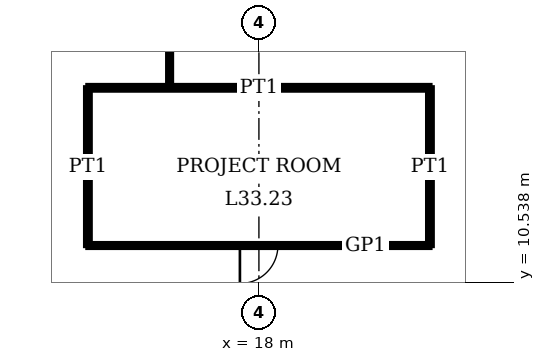
"""IFC4 building model, lengths in metres.
Left out: names, types, materials, properties, quantities, classifications, styles, units other than length and angle.
Written with IfcOpenShell. Run it as: python <this file> out.ifc"""

import sys

from ifc_helpers import new_model, si_unit, direction, frame, frame_2d, origin, place, context, subcontext, project, spatial, rectangle, extrude, element, fill, save


model = new_model("IFC4")
c1 = context("Model", 3, precision=1e-05, world=origin(), true_north=direction((0.0, 1.0)))
c2 = subcontext(c1, "Body", "Model", "MODEL_VIEW")
j1 = project(units=[si_unit("LENGTHUNIT", "METRE"), si_unit("PLANEANGLEUNIT", "RADIAN")], contexts=[c1])
p1 = place(None, origin())
s1 = spatial("IfcSite", under=j1, at=p1, CompositionType="ELEMENT")
p2 = place(p1, origin())
s2 = spatial("IfcBuilding", under=s1, at=p2, CompositionType="ELEMENT")
p3 = place(p2, frame((0.0, 0.0, 137.0)))
s3 = spatial("IfcBuildingStorey", under=s2, at=p3, CompositionType="ELEMENT", Elevation=137.0)
p4 = place(p3, frame((13.5, 11.5, 0.0), z_axis=(0.0, 0.0, 1.0), x_axis=(1.0, 0.0, 0.0)))
e1 = element("IfcWall", 1, at=p4, inside=s3, PredefinedType="PARTITIONING", context=c2, shape_type="SweptSolid", body=[
    extrude(rectangle(XDim=9.0, YDim=0.1, at=frame_2d((4.5, 0.0))), origin(), (0.0, 0.0, 1.0), 3.75),
])
p5 = place(p4, frame((4.0, 0.0, 0.0)))
e2 = element("IfcOpeningElement", 2, at=p5, cuts=e1, PredefinedType="OPENING", context=c2, shape_type="SweptSolid", body=[
    extrude(rectangle(XDim=1.0, YDim=2.4, at=frame_2d((0.5, 1.2))), frame((0.0, 0.06, 0.0), z_axis=(0.0, -1.0, 0.0), x_axis=(1.0, 0.0, 0.0)), (0.0, 0.0, 1.0), 0.12),
])
p6 = place(p3, frame((13.5, 15.65, 0.0), z_axis=(0.0, 0.0, 1.0), x_axis=(1.0, 0.0, 0.0)))
e3 = element("IfcWall", 3, at=p6, inside=s3, PredefinedType="PARTITIONING", context=c2, shape_type="SweptSolid", body=[
    extrude(rectangle(XDim=9.0, YDim=0.12, at=frame_2d((4.5, 0.0))), origin(), (0.0, 0.0, 1.0), 3.75),
])
p7 = place(p3, frame((13.5, 11.5, 0.0), z_axis=(0.0, 0.0, 1.0), x_axis=(0.0, 1.0, 0.0)))
e4 = element("IfcWall", 4, at=p7, inside=s3, PredefinedType="PARTITIONING", context=c2, shape_type="SweptSolid", body=[
    extrude(rectangle(XDim=4.15, YDim=0.12, at=frame_2d((2.075, 0.0))), origin(), (0.0, 0.0, 1.0), 3.75),
])
p8 = place(p3, frame((15.65, 15.65, 0.0), z_axis=(0.0, 0.0, 1.0), x_axis=(0.0, 1.0, 0.0)))
e5 = element("IfcWall", 5, at=p8, inside=s3, PredefinedType="PARTITIONING", context=c2, shape_type="SweptSolid", body=[
    extrude(rectangle(XDim=6.85, YDim=0.1, at=frame_2d((3.425, 0.0))), origin(), (0.0, 0.0, 1.0), 3.75),
])
p9 = place(p8, frame((2.925, 0.0, 0.0)))
e6 = element("IfcOpeningElement", 6, at=p9, cuts=e5, PredefinedType="OPENING", context=c2, shape_type="SweptSolid", body=[
    extrude(rectangle(XDim=1.0, YDim=2.4, at=frame_2d((0.5, 1.2))), frame((0.0, 0.06, 0.0), z_axis=(0.0, -1.0, 0.0), x_axis=(1.0, 0.0, 0.0)), (0.0, 0.0, 1.0), 0.12),
])
p10 = place(p3, frame((22.5, 11.5, 0.0), z_axis=(0.0, 0.0, 1.0), x_axis=(0.0, 1.0, 0.0)))
e7 = element("IfcWall", 7, at=p10, inside=s3, PredefinedType="PARTITIONING", context=c2, shape_type="SweptSolid", body=[
    extrude(rectangle(XDim=4.15, YDim=0.12, at=frame_2d((2.075, 0.0))), origin(), (0.0, 0.0, 1.0), 3.75),
])
p11 = place(p5, origin())
e8 = element("IfcDoor", 8, at=p11, inside=s3, OperationType="SINGLE_SWING_LEFT", PredefinedType="DOOR", context=c2, shape_type="SweptSolid", body=[
    extrude(rectangle(XDim=1.0, YDim=2.4, at=frame_2d((0.5, 1.2))), frame((0.0, 0.02, 0.0), z_axis=(0.0, -1.0, 0.0), x_axis=(1.0, 0.0, 0.0)), (0.0, 0.0, 1.0), 0.04),
])
fill(e2, e8)
save(model, sys.argv[1])
